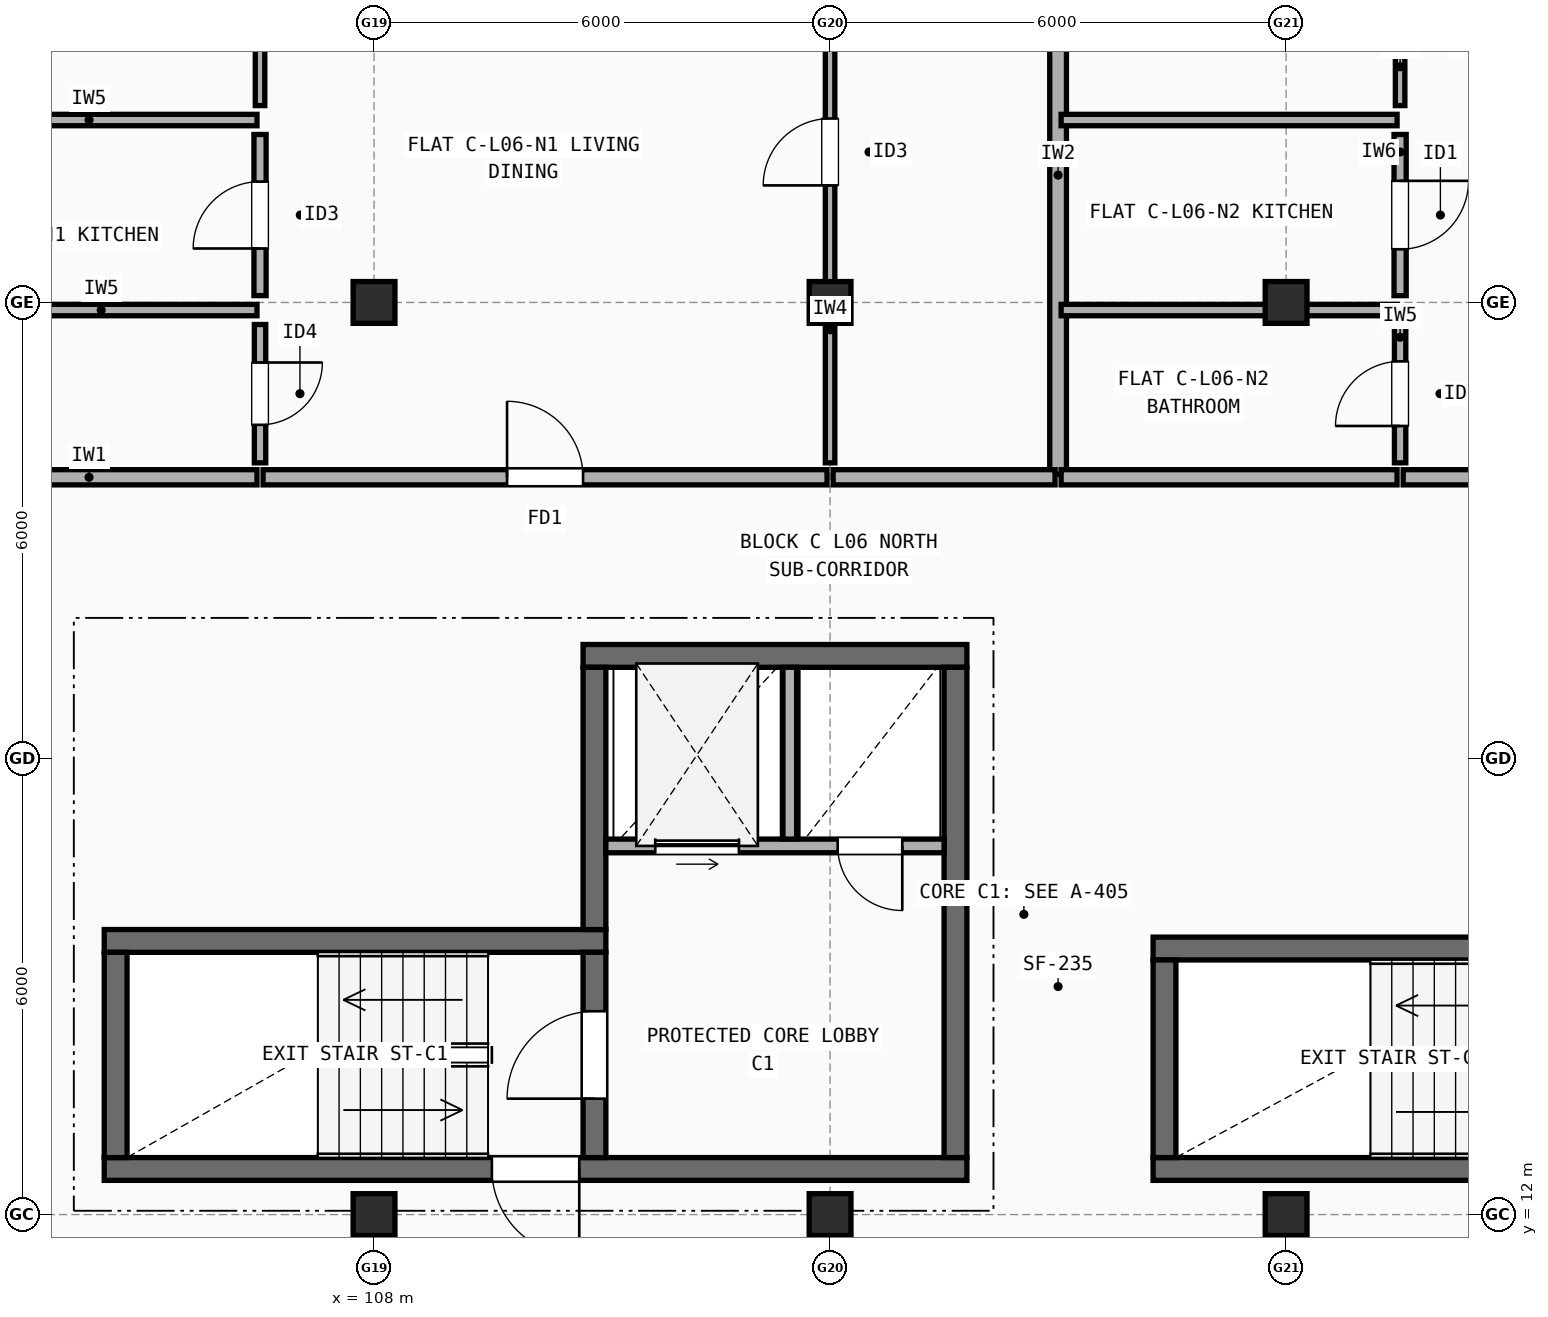
"""IFC4 building model, lengths in metres.
Left out: names, types, materials, properties, quantities, classifications, styles, units other than length and angle.
Written with IfcOpenShell. Run it as: python <this file> out.ifc"""

import sys

from ifc_helpers import new_model, si_unit, direction, frame, frame_2d, origin, origin_2d, place, context, subcontext, project, spatial, rectangle, extrude, element, fill, save


model = new_model("IFC4")
c1 = context("Model", 3, precision=1e-05, world=origin(), true_north=direction((0.0, 1.0)))
c2 = subcontext(c1, "Body", "Model", "MODEL_VIEW")
j1 = project(units=[si_unit("LENGTHUNIT", "METRE"), si_unit("PLANEANGLEUNIT", "RADIAN")], contexts=[c1])
p1 = place(None, origin())
s1 = spatial("IfcSite", under=j1, at=p1, CompositionType="ELEMENT")
p2 = place(p1, origin())
s2 = spatial("IfcBuilding", under=s1, at=p2, CompositionType="ELEMENT")
p3 = place(p2, frame((0.0, 0.0, 20.5)))
s3 = spatial("IfcBuildingStorey", under=s2, at=p3, CompositionType="ELEMENT", Elevation=20.5)
for number, where, z_axis, x_axis in (
    (1, (108.0, 12.0, 0.0), (0.0, 0.0, 1.0), (1.0, 0.0, 0.0)),
    (2, (108.0, 24.0, 0.0), (0.0, 0.0, 1.0), (1.0, 0.0, 0.0)),
    (3, (114.0, 12.0, 0.0), (0.0, 0.0, 1.0), (1.0, 0.0, 0.0)),
    (4, (114.0, 24.0, 0.0), (0.0, 0.0, 1.0), (1.0, 0.0, 0.0)),
    (5, (120.0, 12.0, 0.0), (0.0, 0.0, 1.0), (1.0, 0.0, 0.0)),
    (6, (120.0, 24.0, 0.0), (0.0, 0.0, 1.0), (1.0, 0.0, 0.0)),
):
    element("IfcColumn", number, at=place(p3, frame(where, z_axis=z_axis, x_axis=x_axis)), inside=s3, PredefinedType="COLUMN", context=c2, shape_type="SweptSolid", body=[
        extrude(rectangle(XDim=0.55, YDim=0.55, at=origin_2d()), origin(), (0.0, 0.0, 1.0), 2.97),
    ])
p4 = place(p3, frame((104.45, 12.6, 0.0), z_axis=(0.0, 0.0, 1.0), x_axis=(1.0, 0.0, 0.0)))
e7 = element("IfcWall", 7, at=p4, inside=s3, PredefinedType="SHEAR", context=c2, shape_type="SweptSolid", body=[
    extrude(rectangle(XDim=11.35, YDim=0.3, at=frame_2d((5.675, 0.0))), origin(), (0.0, 0.0, 1.0), 2.97),
])
p5 = place(p4, frame((5.1, 0.0, 0.0)))
e8 = element("IfcOpeningElement", 8, at=p5, cuts=e7, PredefinedType="OPENING", context=c2, shape_type="SweptSolid", body=[
    extrude(rectangle(XDim=1.15, YDim=2.15, at=frame_2d((0.575, 1.075))), frame((0.0, 0.16, 0.0), z_axis=(0.0, -1.0, 0.0), x_axis=(1.0, 0.0, 0.0)), (0.0, 0.0, 1.0), 0.32),
])
p6 = place(p3, frame((111.05, 15.6, 0.0), z_axis=(0.0, 0.0, 1.0), x_axis=(-1.0, 0.0, 0.0)))
e9 = element("IfcWall", 9, at=p6, inside=s3, PredefinedType="SHEAR", context=c2, shape_type="SweptSolid", body=[
    extrude(rectangle(XDim=6.6, YDim=0.3, at=frame_2d((3.3, 0.0))), origin(), (0.0, 0.0, 1.0), 2.97),
])
p7 = place(p3, frame((104.6, 15.45, 0.0), z_axis=(0.0, 0.0, 1.0), x_axis=(0.0, -1.0, 0.0)))
e10 = element("IfcWall", 10, at=p7, inside=s3, PredefinedType="SHEAR", context=c2, shape_type="SweptSolid", body=[
    extrude(rectangle(XDim=2.7, YDim=0.3, at=frame_2d((1.35, 0.0))), origin(), (0.0, 0.0, 1.0), 2.97),
])
p8 = place(p3, frame((110.9, 12.75, 0.0), z_axis=(0.0, 0.0, 1.0), x_axis=(0.0, 1.0, 0.0)))
e11 = element("IfcWall", 11, at=p8, inside=s3, PredefinedType="SHEAR", context=c2, shape_type="SweptSolid", body=[
    extrude(rectangle(XDim=2.7, YDim=0.3, at=frame_2d((1.35, 0.0))), origin(), (0.0, 0.0, 1.0), 2.97),
])
p9 = place(p8, frame((0.775, 0.0, 0.0)))
e12 = element("IfcOpeningElement", 12, at=p9, cuts=e11, PredefinedType="OPENING", context=c2, shape_type="SweptSolid", body=[
    extrude(rectangle(XDim=1.15, YDim=2.15, at=frame_2d((0.575, 1.075))), frame((0.0, 0.16, 0.0), z_axis=(0.0, -1.0, 0.0), x_axis=(1.0, 0.0, 0.0)), (0.0, 0.0, 1.0), 0.32),
])
p10 = place(p3, frame((115.8, 19.35, 0.0), z_axis=(0.0, 0.0, 1.0), x_axis=(-1.0, 0.0, 0.0)))
e13 = element("IfcWall", 13, at=p10, inside=s3, PredefinedType="SHEAR", context=c2, shape_type="SweptSolid", body=[
    extrude(rectangle(XDim=5.05, YDim=0.3, at=frame_2d((2.525, 0.0))), origin(), (0.0, 0.0, 1.0), 2.97),
])
p11 = place(p3, frame((115.65, 12.75, 0.0), z_axis=(0.0, 0.0, 1.0), x_axis=(0.0, 1.0, 0.0)))
e14 = element("IfcWall", 14, at=p11, inside=s3, PredefinedType="SHEAR", context=c2, shape_type="SweptSolid", body=[
    extrude(rectangle(XDim=6.45, YDim=0.3, at=frame_2d((3.225, 0.0))), origin(), (0.0, 0.0, 1.0), 2.97),
])
p12 = place(p3, frame((110.9, 15.75, 0.0), z_axis=(0.0, 0.0, 1.0), x_axis=(0.0, 1.0, 0.0)))
e15 = element("IfcWall", 15, at=p12, inside=s3, PredefinedType="SHEAR", context=c2, shape_type="SweptSolid", body=[
    extrude(rectangle(XDim=3.45, YDim=0.3, at=frame_2d((1.725, 0.0))), origin(), (0.0, 0.0, 1.0), 2.97),
])
p13 = place(p3, frame((111.05, 16.85, 0.0), z_axis=(0.0, 0.0, 1.0), x_axis=(1.0, 0.0, 0.0)))
e16 = element("IfcWall", 16, at=p13, inside=s3, PredefinedType="SOLIDWALL", context=c2, shape_type="SweptSolid", body=[
    extrude(rectangle(XDim=4.45, YDim=0.18, at=frame_2d((2.225, 0.0))), origin(), (0.0, 0.0, 1.0), 2.97),
])
p14 = place(p13, frame((0.65, 0.0, 0.0)))
e17 = element("IfcOpeningElement", 17, at=p14, cuts=e16, PredefinedType="OPENING", context=c2, shape_type="SweptSolid", body=[
    extrude(rectangle(XDim=1.1, YDim=2.15, at=frame_2d((0.55, 1.075))), frame((0.0, 0.1, 0.0), z_axis=(0.0, -1.0, 0.0), x_axis=(1.0, 0.0, 0.0)), (0.0, 0.0, 1.0), 0.2),
])
p15 = place(p13, frame((3.05, 0.0, 0.0)))
e18 = element("IfcOpeningElement", 18, at=p15, cuts=e16, PredefinedType="OPENING", context=c2, shape_type="SweptSolid", body=[
    extrude(rectangle(XDim=0.85, YDim=2.1, at=frame_2d((0.425, 1.05))), frame((0.0, 0.1, 0.0), z_axis=(0.0, -1.0, 0.0), x_axis=(1.0, 0.0, 0.0)), (0.0, 0.0, 1.0), 0.2),
])
p16 = place(p3, frame((113.47, 16.94, 0.0), z_axis=(0.0, 0.0, 1.0), x_axis=(0.0, 1.0, 0.0)))
e19 = element("IfcWall", 19, at=p16, inside=s3, PredefinedType="SOLIDWALL", context=c2, shape_type="SweptSolid", body=[
    extrude(rectangle(XDim=2.26, YDim=0.18, at=frame_2d((1.13, 0.0))), origin(), (0.0, 0.0, 1.0), 2.97),
])
p17 = place(p3, frame((118.25, 12.6, 0.0), z_axis=(0.0, 0.0, 1.0), x_axis=(1.0, 0.0, 0.0)))
e20 = element("IfcWall", 20, at=p17, inside=s3, PredefinedType="SHEAR", context=c2, shape_type="SweptSolid", body=[
    extrude(rectangle(XDim=11.35, YDim=0.3, at=frame_2d((5.675, 0.0))), origin(), (0.0, 0.0, 1.0), 2.97),
])
p18 = place(p17, frame((8.1, 0.0, 0.0)))
e21 = element("IfcOpeningElement", 21, at=p18, cuts=e20, PredefinedType="OPENING", context=c2, shape_type="SweptSolid", body=[
    extrude(rectangle(XDim=1.2, YDim=2.15, at=frame_2d((0.6, 1.075))), frame((0.0, 0.16, 0.0), z_axis=(0.0, -1.0, 0.0), x_axis=(1.0, 0.0, 0.0)), (0.0, 0.0, 1.0), 0.32),
])
p19 = place(p3, frame((124.85, 15.5, 0.0), z_axis=(0.0, 0.0, 1.0), x_axis=(-1.0, 0.0, 0.0)))
e22 = element("IfcWall", 22, at=p19, inside=s3, PredefinedType="SHEAR", context=c2, shape_type="SweptSolid", body=[
    extrude(rectangle(XDim=6.6, YDim=0.3, at=frame_2d((3.3, 0.0))), origin(), (0.0, 0.0, 1.0), 2.97),
])
p20 = place(p3, frame((118.4, 15.35, 0.0), z_axis=(0.0, 0.0, 1.0), x_axis=(0.0, -1.0, 0.0)))
e23 = element("IfcWall", 23, at=p20, inside=s3, PredefinedType="SHEAR", context=c2, shape_type="SweptSolid", body=[
    extrude(rectangle(XDim=2.6, YDim=0.3, at=frame_2d((1.3, 0.0))), origin(), (0.0, 0.0, 1.0), 2.97),
])
p21 = place(p3, frame((117.0, 21.74, 0.0), z_axis=(0.0, 0.0, 1.0), x_axis=(0.0, 1.0, 0.0)))
e24 = element("IfcWall", 24, at=p21, inside=s3, PredefinedType="SOLIDWALL", context=c2, shape_type="SweptSolid", body=[
    extrude(rectangle(XDim=7.87, YDim=0.22, at=frame_2d((3.935, 0.0))), origin(), (0.0, 0.0, 1.0), 2.408),
])
p22 = place(p3, frame((102.04, 21.7, 0.0), z_axis=(0.0, 0.0, 1.0), x_axis=(1.0, 0.0, 0.0)))
e25 = element("IfcWall", 25, at=p22, inside=s3, PredefinedType="SOLIDWALL", context=c2, shape_type="SweptSolid", body=[
    extrude(rectangle(XDim=4.42, YDim=0.2, at=frame_2d((2.21, 0.0))), origin(), (0.0, 0.0, 1.0), 2.452),
])
p23 = place(p3, frame((106.54, 21.7, 0.0), z_axis=(0.0, 0.0, 1.0), x_axis=(1.0, 0.0, 0.0)))
e26 = element("IfcWall", 26, at=p23, inside=s3, PredefinedType="SOLIDWALL", context=c2, shape_type="SweptSolid", body=[
    extrude(rectangle(XDim=7.42, YDim=0.2, at=frame_2d((3.71, 0.0))), origin(), (0.0, 0.0, 1.0), 2.508),
])
p24 = place(p23, frame((3.21, 0.0, 0.0)))
e27 = element("IfcOpeningElement", 27, at=p24, cuts=e26, PredefinedType="OPENING", context=c2, shape_type="SweptSolid", body=[
    extrude(rectangle(XDim=1.0, YDim=2.15, at=frame_2d((0.5, 1.075))), frame((0.0, 0.11, 0.0), z_axis=(0.0, -1.0, 0.0), x_axis=(1.0, 0.0, 0.0)), (0.0, 0.0, 1.0), 0.22),
])
p25 = place(p3, frame((106.5, 26.59, 0.0), z_axis=(0.0, 0.0, 1.0), x_axis=(0.0, 1.0, 0.0)))
e28 = element("IfcWall", 28, at=p25, inside=s3, PredefinedType="PARTITIONING", context=c2, shape_type="SweptSolid", body=[
    extrude(rectangle(XDim=3.22, YDim=0.125, at=frame_2d((1.61, 0.0))), origin(), (0.0, 0.0, 1.0), 2.97),
])
p26 = place(p25, frame((1.16, 0.0, 0.0)))
e29 = element("IfcOpeningElement", 29, at=p26, cuts=e28, PredefinedType="OPENING", context=c2, shape_type="SweptSolid", body=[
    extrude(rectangle(XDim=0.9, YDim=2.1, at=frame_2d((0.45, 1.05))), frame((0.0, 0.073, 0.0), z_axis=(0.0, -1.0, 0.0), x_axis=(1.0, 0.0, 0.0)), (0.0, 0.0, 1.0), 0.145),
])
p27 = place(p3, frame((106.5, 24.09, 0.0), z_axis=(0.0, 0.0, 1.0), x_axis=(0.0, 1.0, 0.0)))
e30 = element("IfcWall", 30, at=p27, inside=s3, PredefinedType="PLUMBINGWALL", context=c2, shape_type="SweptSolid", body=[
    extrude(rectangle(XDim=2.12, YDim=0.16, at=frame_2d((1.06, 0.0))), origin(), (0.0, 0.0, 1.0), 2.97),
])
p28 = place(p27, frame((0.62, 0.0, 0.0)))
e31 = element("IfcOpeningElement", 31, at=p28, cuts=e30, PredefinedType="OPENING", context=c2, shape_type="SweptSolid", body=[
    extrude(rectangle(XDim=0.88, YDim=2.1, at=frame_2d((0.44, 1.05))), frame((0.0, 0.09, 0.0), z_axis=(0.0, -1.0, 0.0), x_axis=(1.0, 0.0, 0.0)), (0.0, 0.0, 1.0), 0.18),
])
p29 = place(p3, frame((106.5, 21.89, 0.0), z_axis=(0.0, 0.0, 1.0), x_axis=(0.0, 1.0, 0.0)))
e32 = element("IfcWall", 32, at=p29, inside=s3, PredefinedType="PARTITIONING", context=c2, shape_type="SweptSolid", body=[
    extrude(rectangle(XDim=1.82, YDim=0.15, at=frame_2d((0.91, 0.0))), origin(), (0.0, 0.0, 1.0), 2.97),
])
p30 = place(p29, frame((0.5, 0.0, 0.0)))
e33 = element("IfcOpeningElement", 33, at=p30, cuts=e32, PredefinedType="OPENING", context=c2, shape_type="SweptSolid", body=[
    extrude(rectangle(XDim=0.82, YDim=2.08, at=frame_2d((0.41, 1.04))), frame((0.0, 0.085, 0.0), z_axis=(0.0, -1.0, 0.0), x_axis=(1.0, 0.0, 0.0)), (0.0, 0.0, 1.0), 0.17),
])
p31 = place(p3, frame((102.04, 26.4, 0.0), z_axis=(0.0, 0.0, 1.0), x_axis=(1.0, 0.0, 0.0)))
e34 = element("IfcWall", 34, at=p31, inside=s3, PredefinedType="PARTITIONING", context=c2, shape_type="SweptSolid", body=[
    extrude(rectangle(XDim=4.42, YDim=0.15, at=frame_2d((2.21, 0.0))), origin(), (0.0, 0.0, 1.0), 2.452),
])
p32 = place(p3, frame((102.36, 23.9, 0.0), z_axis=(0.0, 0.0, 1.0), x_axis=(1.0, 0.0, 0.0)))
e35 = element("IfcWall", 35, at=p32, inside=s3, PredefinedType="PARTITIONING", context=c2, shape_type="SweptSolid", body=[
    extrude(rectangle(XDim=4.1, YDim=0.15, at=frame_2d((2.05, 0.0))), origin(), (0.0, 0.0, 1.0), 2.548),
])
p33 = place(p3, frame((114.04, 21.7, 0.0), z_axis=(0.0, 0.0, 1.0), x_axis=(1.0, 0.0, 0.0)))
e36 = element("IfcWall", 36, at=p33, inside=s3, PredefinedType="SOLIDWALL", context=c2, shape_type="SweptSolid", body=[
    extrude(rectangle(XDim=2.92, YDim=0.2, at=frame_2d((1.46, 0.0))), origin(), (0.0, 0.0, 1.0), 2.508),
])
p34 = place(p3, frame((114.0, 21.89, 0.0), z_axis=(0.0, 0.0, 1.0), x_axis=(0.0, 1.0, 0.0)))
e37 = element("IfcWall", 37, at=p34, inside=s3, PredefinedType="PARTITIONING", context=c2, shape_type="SweptSolid", body=[
    extrude(rectangle(XDim=7.6, YDim=0.125, at=frame_2d((3.8, 0.0))), origin(), (0.0, 0.0, 1.0), 2.458),
])
p35 = place(p34, frame((3.65, 0.0, 0.0)))
e38 = element("IfcOpeningElement", 38, at=p35, cuts=e37, PredefinedType="OPENING", context=c2, shape_type="SweptSolid", body=[
    extrude(rectangle(XDim=0.88, YDim=2.1, at=frame_2d((0.44, 1.05))), frame((0.0, 0.073, 0.0), z_axis=(0.0, -1.0, 0.0), x_axis=(1.0, 0.0, 0.0)), (0.0, 0.0, 1.0), 0.145),
])
p36 = place(p3, frame((117.04, 21.7, 0.0), z_axis=(0.0, 0.0, 1.0), x_axis=(1.0, 0.0, 0.0)))
e39 = element("IfcWall", 39, at=p36, inside=s3, PredefinedType="SOLIDWALL", context=c2, shape_type="SweptSolid", body=[
    extrude(rectangle(XDim=4.42, YDim=0.2, at=frame_2d((2.21, 0.0))), origin(), (0.0, 0.0, 1.0), 2.97),
])
p37 = place(p3, frame((121.54, 21.7, 0.0), z_axis=(0.0, 0.0, 1.0), x_axis=(1.0, 0.0, 0.0)))
e40 = element("IfcWall", 40, at=p37, inside=s3, PredefinedType="SOLIDWALL", context=c2, shape_type="SweptSolid", body=[
    extrude(rectangle(XDim=7.42, YDim=0.2, at=frame_2d((3.71, 0.0))), origin(), (0.0, 0.0, 1.0), 2.97),
])
p38 = place(p37, frame((3.185, 0.0, 0.0)))
e41 = element("IfcOpeningElement", 41, at=p38, cuts=e40, PredefinedType="OPENING", context=c2, shape_type="SweptSolid", body=[
    extrude(rectangle(XDim=1.05, YDim=2.15, at=frame_2d((0.525, 1.075))), frame((0.0, 0.11, 0.0), z_axis=(0.0, -1.0, 0.0), x_axis=(1.0, 0.0, 0.0)), (0.0, 0.0, 1.0), 0.22),
])
p39 = place(p3, frame((121.5, 26.59, 0.0), z_axis=(0.0, 0.0, 1.0), x_axis=(0.0, 1.0, 0.0)))
e42 = element("IfcWall", 42, at=p39, inside=s3, PredefinedType="PARTITIONING", context=c2, shape_type="SweptSolid", body=[
    extrude(rectangle(XDim=3.22, YDim=0.125, at=frame_2d((1.61, 0.0))), origin(), (0.0, 0.0, 1.0), 2.97),
])
p40 = place(p39, frame((1.17, 0.0, 0.0)))
e43 = element("IfcOpeningElement", 43, at=p40, cuts=e42, PredefinedType="OPENING", context=c2, shape_type="SweptSolid", body=[
    extrude(rectangle(XDim=0.88, YDim=2.1, at=frame_2d((0.44, 1.05))), frame((0.0, 0.073, 0.0), z_axis=(0.0, -1.0, 0.0), x_axis=(1.0, 0.0, 0.0)), (0.0, 0.0, 1.0), 0.145),
])
p41 = place(p3, frame((121.5, 24.09, 0.0), z_axis=(0.0, 0.0, 1.0), x_axis=(0.0, 1.0, 0.0)))
e44 = element("IfcWall", 44, at=p41, inside=s3, PredefinedType="PLUMBINGWALL", context=c2, shape_type="SweptSolid", body=[
    extrude(rectangle(XDim=2.12, YDim=0.16, at=frame_2d((1.06, 0.0))), origin(), (0.0, 0.0, 1.0), 2.97),
])
p42 = place(p41, frame((0.61, 0.0, 0.0)))
e45 = element("IfcOpeningElement", 45, at=p42, cuts=e44, PredefinedType="OPENING", context=c2, shape_type="SweptSolid", body=[
    extrude(rectangle(XDim=0.9, YDim=2.1, at=frame_2d((0.45, 1.05))), frame((0.0, 0.09, 0.0), z_axis=(0.0, -1.0, 0.0), x_axis=(1.0, 0.0, 0.0)), (0.0, 0.0, 1.0), 0.18),
])
p43 = place(p3, frame((121.5, 21.89, 0.0), z_axis=(0.0, 0.0, 1.0), x_axis=(0.0, 1.0, 0.0)))
e46 = element("IfcWall", 46, at=p43, inside=s3, PredefinedType="PARTITIONING", context=c2, shape_type="SweptSolid", body=[
    extrude(rectangle(XDim=1.82, YDim=0.15, at=frame_2d((0.91, 0.0))), origin(), (0.0, 0.0, 1.0), 2.97),
])
p44 = place(p43, frame((0.485, 0.0, 0.0)))
e47 = element("IfcOpeningElement", 47, at=p44, cuts=e46, PredefinedType="OPENING", context=c2, shape_type="SweptSolid", body=[
    extrude(rectangle(XDim=0.85, YDim=2.1, at=frame_2d((0.425, 1.05))), frame((0.0, 0.085, 0.0), z_axis=(0.0, -1.0, 0.0), x_axis=(1.0, 0.0, 0.0)), (0.0, 0.0, 1.0), 0.17),
])
p45 = place(p3, frame((117.04, 26.4, 0.0), z_axis=(0.0, 0.0, 1.0), x_axis=(1.0, 0.0, 0.0)))
e48 = element("IfcWall", 48, at=p45, inside=s3, PredefinedType="PARTITIONING", context=c2, shape_type="SweptSolid", body=[
    extrude(rectangle(XDim=4.42, YDim=0.15, at=frame_2d((2.21, 0.0))), origin(), (0.0, 0.0, 1.0), 2.458),
])
p46 = place(p3, frame((117.04, 23.9, 0.0), z_axis=(0.0, 0.0, 1.0), x_axis=(1.0, 0.0, 0.0)))
e49 = element("IfcWall", 49, at=p46, inside=s3, PredefinedType="PARTITIONING", context=c2, shape_type="SweptSolid", body=[
    extrude(rectangle(XDim=4.42, YDim=0.15, at=frame_2d((2.21, 0.0))), origin(), (0.0, 0.0, 1.0), 2.408),
])
p47 = place(p5, origin())
e50 = element("IfcDoor", 50, at=p47, inside=s3, OperationType="SINGLE_SWING_RIGHT", PredefinedType="DOOR", context=c2, shape_type="SweptSolid", body=[
    extrude(rectangle(XDim=1.15, YDim=2.15, at=frame_2d((0.575, 1.075))), frame((0.0, 0.025, 0.0), z_axis=(0.0, -1.0, 0.0), x_axis=(1.0, 0.0, 0.0)), (0.0, 0.0, 1.0), 0.05),
])
fill(e8, e50)
p48 = place(p9, origin())
e51 = element("IfcDoor", 51, at=p48, inside=s3, OperationType="SINGLE_SWING_LEFT", PredefinedType="DOOR", context=c2, shape_type="SweptSolid", body=[
    extrude(rectangle(XDim=1.15, YDim=2.15, at=frame_2d((0.575, 1.075))), frame((0.0, 0.025, 0.0), z_axis=(0.0, -1.0, 0.0), x_axis=(1.0, 0.0, 0.0)), (0.0, 0.0, 1.0), 0.05),
])
fill(e12, e51)
p49 = place(p14, origin())
e52 = element("IfcDoor", 52, at=p49, inside=s3, OperationType="SLIDING_TO_LEFT", PredefinedType="DOOR", context=c2, shape_type="SweptSolid", body=[
    extrude(rectangle(XDim=1.1, YDim=2.15, at=frame_2d((0.55, 1.075))), frame((0.0, 0.025, 0.0), z_axis=(0.0, -1.0, 0.0), x_axis=(1.0, 0.0, 0.0)), (0.0, 0.0, 1.0), 0.05),
])
fill(e17, e52)
p50 = place(p15, frame((0.85, 0.0, 0.0), z_axis=(0.0, 0.0, 1.0), x_axis=(-1.0, 0.0, 0.0)))
e53 = element("IfcDoor", 53, at=p50, inside=s3, OperationType="SINGLE_SWING_RIGHT", PredefinedType="DOOR", context=c2, shape_type="SweptSolid", body=[
    extrude(rectangle(XDim=0.85, YDim=2.1, at=frame_2d((0.425, 1.05))), frame((0.0, 0.025, 0.0), z_axis=(0.0, -1.0, 0.0), x_axis=(1.0, 0.0, 0.0)), (0.0, 0.0, 1.0), 0.05),
])
fill(e18, e53)
p51 = place(p24, origin())
e54 = element("IfcDoor", 54, at=p51, inside=s3, OperationType="SINGLE_SWING_LEFT", PredefinedType="DOOR", context=c2, shape_type="SweptSolid", body=[
    extrude(rectangle(XDim=1.0, YDim=2.15, at=frame_2d((0.5, 1.075))), frame((0.0, 0.025, 0.0), z_axis=(0.0, -1.0, 0.0), x_axis=(1.0, 0.0, 0.0)), (0.0, 0.0, 1.0), 0.05),
])
fill(e27, e54)
p52 = place(p28, origin())
e55 = element("IfcDoor", 55, at=p52, inside=s3, OperationType="SINGLE_SWING_LEFT", PredefinedType="DOOR", context=c2, shape_type="SweptSolid", body=[
    extrude(rectangle(XDim=0.88, YDim=2.1, at=frame_2d((0.44, 1.05))), frame((0.0, 0.025, 0.0), z_axis=(0.0, -1.0, 0.0), x_axis=(1.0, 0.0, 0.0)), (0.0, 0.0, 1.0), 0.05),
])
fill(e31, e55)
p53 = place(p30, origin())
e56 = element("IfcDoor", 56, at=p53, inside=s3, OperationType="SINGLE_SWING_RIGHT", PredefinedType="DOOR", context=c2, shape_type="SweptSolid", body=[
    extrude(rectangle(XDim=0.82, YDim=2.08, at=frame_2d((0.41, 1.04))), frame((0.0, 0.025, 0.0), z_axis=(0.0, -1.0, 0.0), x_axis=(1.0, 0.0, 0.0)), (0.0, 0.0, 1.0), 0.05),
])
fill(e33, e56)
p54 = place(p35, origin())
e57 = element("IfcDoor", 57, at=p54, inside=s3, OperationType="SINGLE_SWING_LEFT", PredefinedType="DOOR", context=c2, shape_type="SweptSolid", body=[
    extrude(rectangle(XDim=0.88, YDim=2.1, at=frame_2d((0.44, 1.05))), frame((0.0, 0.025, 0.0), z_axis=(0.0, -1.0, 0.0), x_axis=(1.0, 0.0, 0.0)), (0.0, 0.0, 1.0), 0.05),
])
fill(e38, e57)
p55 = place(p42, origin())
e58 = element("IfcDoor", 58, at=p55, inside=s3, OperationType="SINGLE_SWING_RIGHT", PredefinedType="DOOR", context=c2, shape_type="SweptSolid", body=[
    extrude(rectangle(XDim=0.9, YDim=2.1, at=frame_2d((0.45, 1.05))), frame((0.0, 0.025, 0.0), z_axis=(0.0, -1.0, 0.0), x_axis=(1.0, 0.0, 0.0)), (0.0, 0.0, 1.0), 0.05),
])
fill(e45, e58)
p56 = place(p44, origin())
e59 = element("IfcDoor", 59, at=p56, inside=s3, OperationType="SINGLE_SWING_LEFT", PredefinedType="DOOR", context=c2, shape_type="SweptSolid", body=[
    extrude(rectangle(XDim=0.85, YDim=2.1, at=frame_2d((0.425, 1.05))), frame((0.0, 0.025, 0.0), z_axis=(0.0, -1.0, 0.0), x_axis=(1.0, 0.0, 0.0)), (0.0, 0.0, 1.0), 0.05),
])
fill(e47, e59)
save(model, sys.argv[1])
